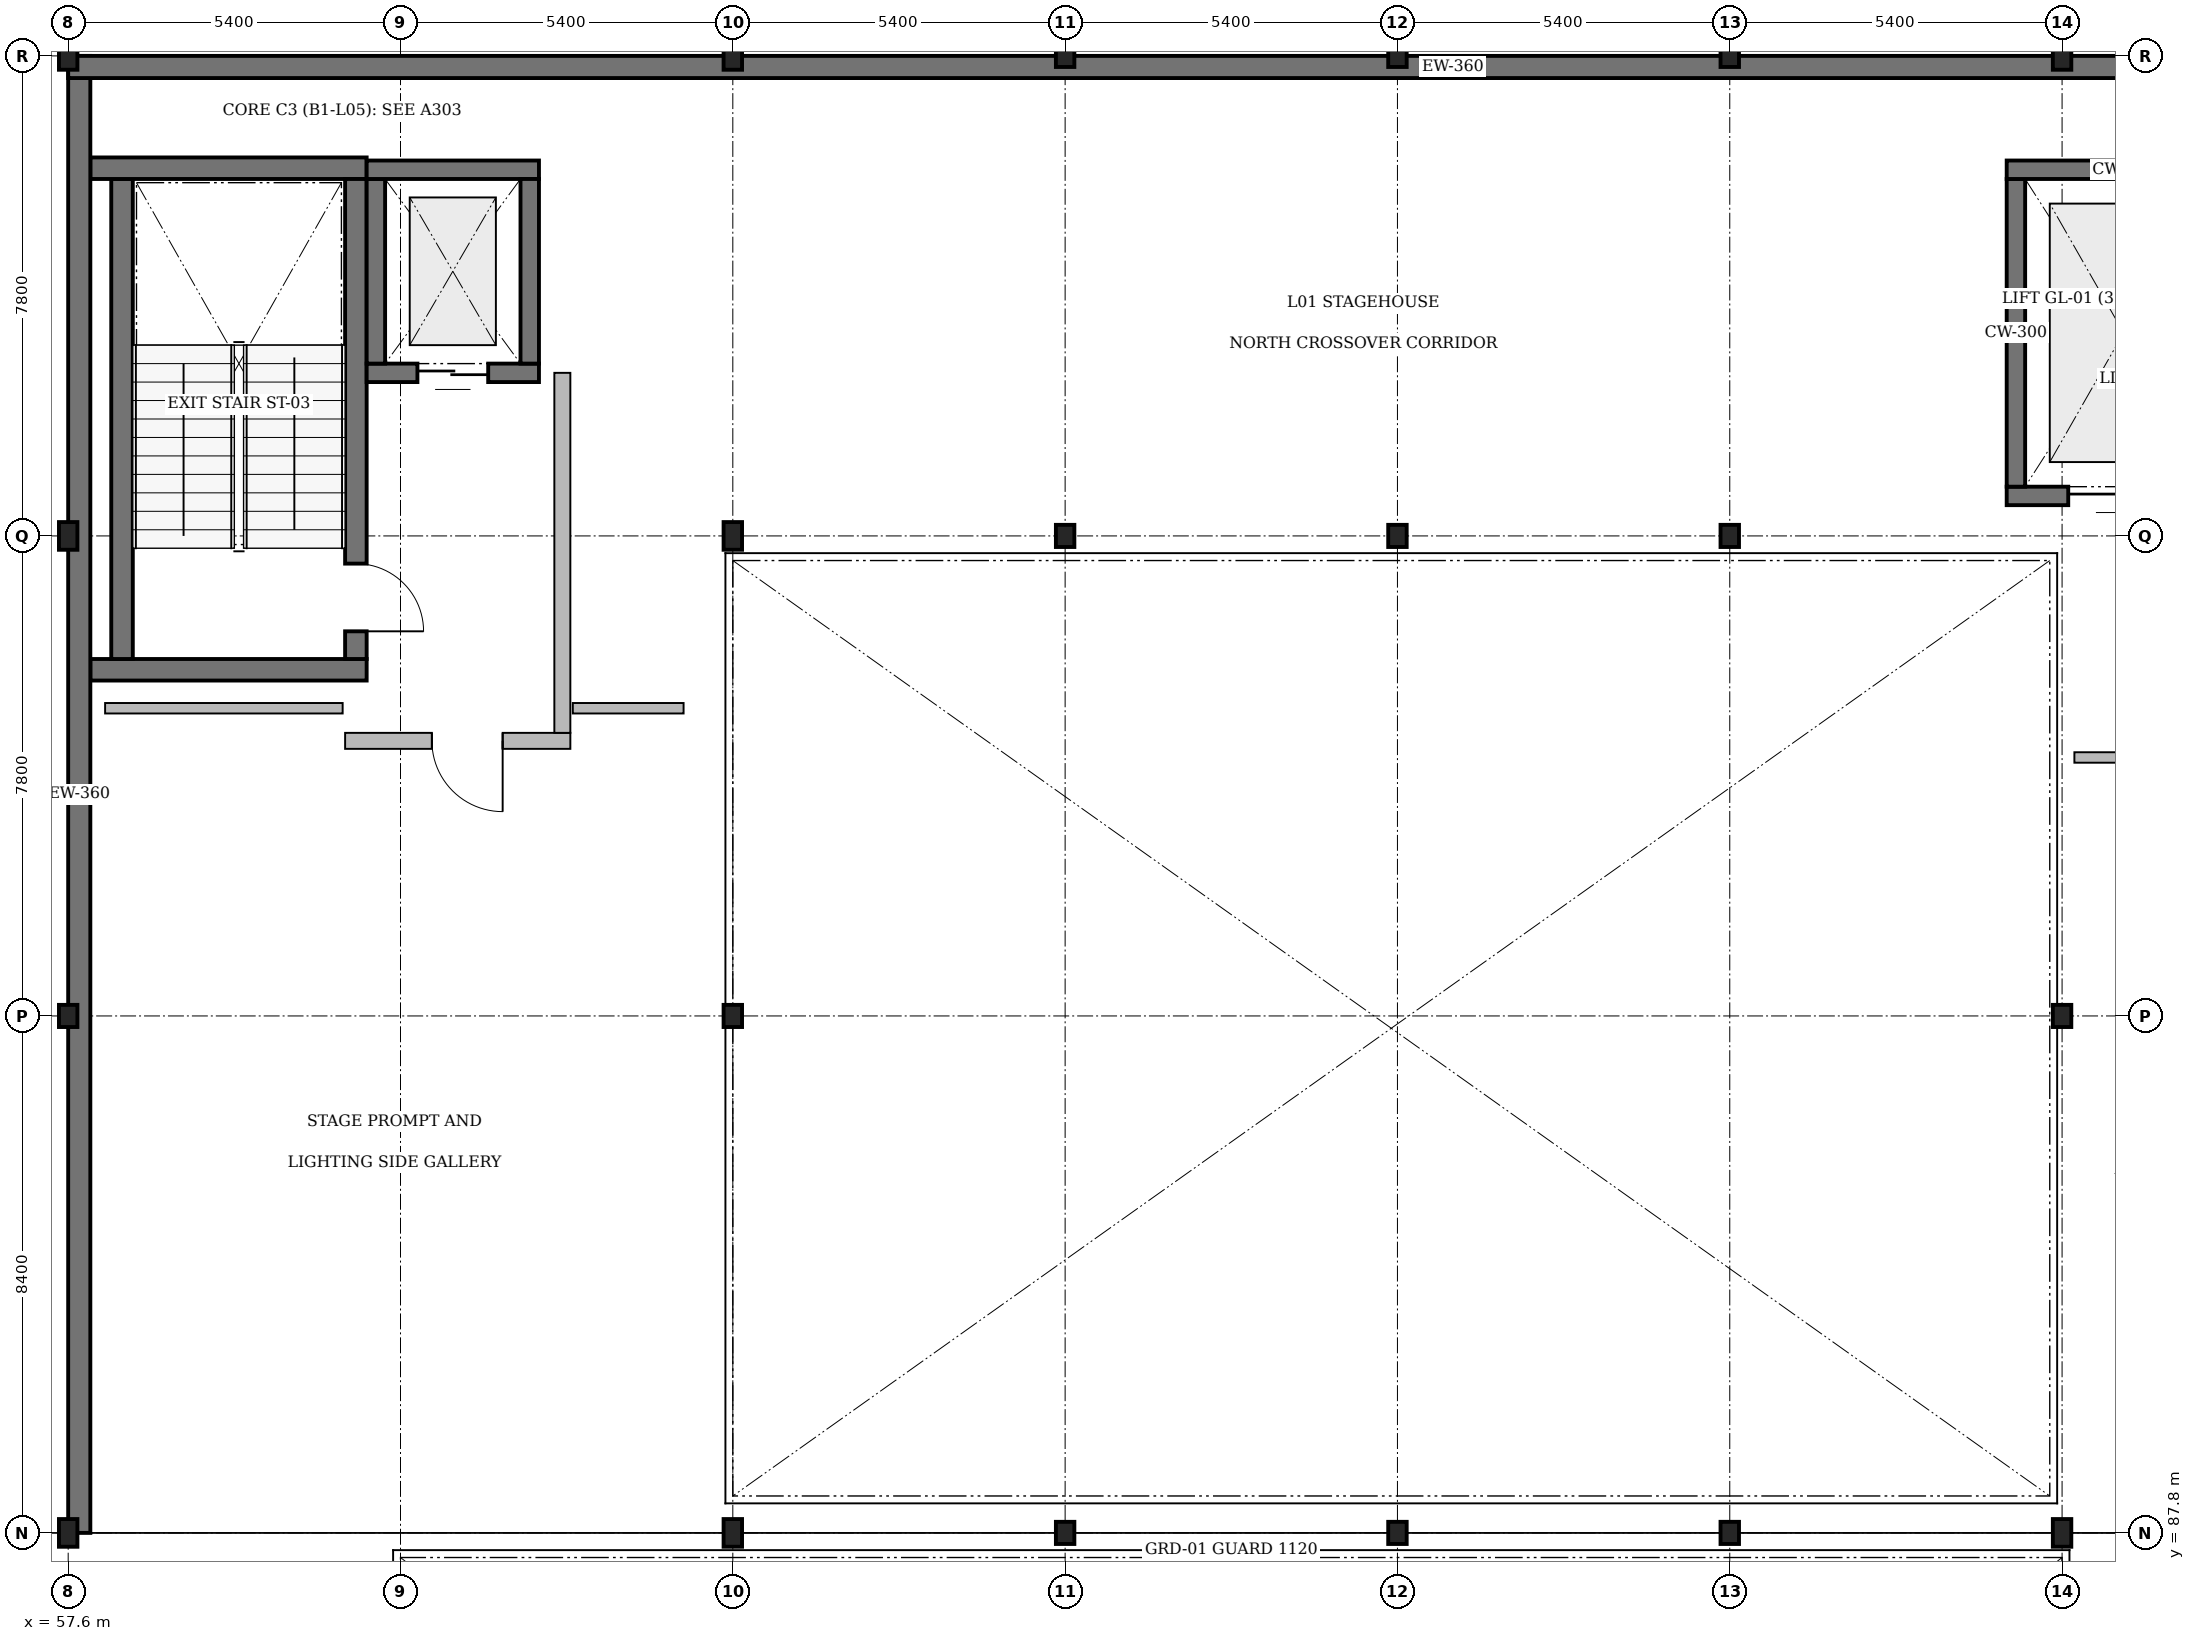
"""IFC4 building model, lengths in metres.
Left out: names, types, materials, properties, quantities, classifications, styles, units other than length and angle.
Written with IfcOpenShell. Run it as: python <this file> out.ifc"""

import sys

from ifc_helpers import new_model, si_unit, direction, frame, frame_2d, origin, origin_2d, place, context, subcontext, project, spatial, rectangle, i_section, extrude, element, fill, save


model = new_model("IFC4")
c1 = context("Model", 3, precision=1e-05, world=origin(), true_north=direction((0.0, 1.0)))
c2 = subcontext(c1, "Body", "Model", "MODEL_VIEW")
j1 = project(units=[si_unit("LENGTHUNIT", "METRE"), si_unit("PLANEANGLEUNIT", "RADIAN")], contexts=[c1])
p1 = place(None, origin())
s1 = spatial("IfcSite", under=j1, at=p1, CompositionType="ELEMENT")
p2 = place(p1, origin())
s2 = spatial("IfcBuilding", under=s1, at=p2, CompositionType="ELEMENT")
p3 = place(p2, frame((0.0, 0.0, 4.8)))
s3 = spatial("IfcBuildingStorey", under=s2, at=p3, CompositionType="ELEMENT", Elevation=4.8)
p4 = place(p3, frame((68.4, 87.8, 0.0), z_axis=(0.0, 0.0, 1.0), x_axis=(1.0, 0.0, 0.0)))
e1 = element("IfcColumn", 1, at=p4, inside=s3, PredefinedType="COLUMN", context=c2, shape_type="SweptSolid", body=[
    extrude(i_section(OverallWidth=0.3, OverallDepth=0.45, WebThickness=0.014, FlangeThickness=0.026, FilletRadius=0.027, at=origin_2d()), origin(), (0.0, 0.0, 1.0), 4.2),
])
p5 = place(p3, frame((68.4, 96.2, 0.0), z_axis=(0.0, 0.0, 1.0), x_axis=(1.0, 0.0, 0.0)))
e2 = element("IfcColumn", 2, at=p5, inside=s3, PredefinedType="COLUMN", context=c2, shape_type="SweptSolid", body=[
    extrude(i_section(OverallWidth=0.3, OverallDepth=0.36, WebThickness=0.012, FlangeThickness=0.022, FilletRadius=0.027, at=origin_2d()), origin(), (0.0, 0.0, 1.0), 4.2),
])
for number, where, z_axis, x_axis in (
    (3, (68.4, 104.0, 0.0), (0.0, 0.0, 1.0), (1.0, 0.0, 0.0)),
    (4, (68.4, 111.8, 0.0), (0.0, 0.0, 1.0), (1.0, 0.0, 0.0)),
):
    element("IfcColumn", number, at=place(p3, frame(where, z_axis=z_axis, x_axis=x_axis)), inside=s3, PredefinedType="COLUMN", context=c2, shape_type="SweptSolid", body=[
        extrude(i_section(OverallWidth=0.3, OverallDepth=0.45, WebThickness=0.014, FlangeThickness=0.026, FilletRadius=0.027, at=origin_2d()), origin(), (0.0, 0.0, 1.0), 4.2),
    ])
for number, where, z_axis, x_axis in (
    (5, (73.8, 87.8, 0.0), (0.0, 0.0, 1.0), (1.0, 0.0, 0.0)),
    (6, (73.8, 104.0, 0.0), (0.0, 0.0, 1.0), (1.0, 0.0, 0.0)),
    (7, (73.8, 111.8, 0.0), (0.0, 0.0, 1.0), (1.0, 0.0, 0.0)),
    (8, (79.2, 87.8, 0.0), (0.0, 0.0, 1.0), (1.0, 0.0, 0.0)),
    (9, (79.2, 104.0, 0.0), (0.0, 0.0, 1.0), (1.0, 0.0, 0.0)),
    (10, (79.2, 111.8, 0.0), (0.0, 0.0, 1.0), (1.0, 0.0, 0.0)),
    (11, (84.6, 87.8, 0.0), (0.0, 0.0, 1.0), (1.0, 0.0, 0.0)),
    (12, (84.6, 104.0, 0.0), (0.0, 0.0, 1.0), (1.0, 0.0, 0.0)),
    (13, (84.6, 111.8, 0.0), (0.0, 0.0, 1.0), (1.0, 0.0, 0.0)),
):
    element("IfcColumn", number, at=place(p3, frame(where, z_axis=z_axis, x_axis=x_axis)), inside=s3, PredefinedType="COLUMN", context=c2, shape_type="SweptSolid", body=[
        extrude(i_section(OverallWidth=0.3, OverallDepth=0.36, WebThickness=0.012, FlangeThickness=0.022, FilletRadius=0.027, at=origin_2d()), origin(), (0.0, 0.0, 1.0), 4.2),
    ])
p6 = place(p3, frame((90.0, 87.8, 0.0), z_axis=(0.0, 0.0, 1.0), x_axis=(1.0, 0.0, 0.0)))
e14 = element("IfcColumn", 14, at=p6, inside=s3, PredefinedType="COLUMN", context=c2, shape_type="SweptSolid", body=[
    extrude(i_section(OverallWidth=0.3, OverallDepth=0.45, WebThickness=0.014, FlangeThickness=0.026, FilletRadius=0.027, at=origin_2d()), origin(), (0.0, 0.0, 1.0), 4.2),
])
p7 = place(p3, frame((90.0, 96.2, 0.0), z_axis=(0.0, 0.0, 1.0), x_axis=(1.0, 0.0, 0.0)))
e15 = element("IfcColumn", 15, at=p7, inside=s3, PredefinedType="COLUMN", context=c2, shape_type="SweptSolid", body=[
    extrude(i_section(OverallWidth=0.3, OverallDepth=0.36, WebThickness=0.012, FlangeThickness=0.022, FilletRadius=0.027, at=origin_2d()), origin(), (0.0, 0.0, 1.0), 4.2),
])
for number, where, z_axis, x_axis in (
    (16, (90.0, 111.8, 0.0), (0.0, 0.0, 1.0), (1.0, 0.0, 0.0)),
    (17, (57.6, 87.8, 0.0), (0.0, 0.0, 1.0), (1.0, 0.0, 0.0)),
):
    element("IfcColumn", number, at=place(p3, frame(where, z_axis=z_axis, x_axis=x_axis)), inside=s3, PredefinedType="COLUMN", context=c2, shape_type="SweptSolid", body=[
        extrude(i_section(OverallWidth=0.3, OverallDepth=0.45, WebThickness=0.014, FlangeThickness=0.026, FilletRadius=0.027, at=origin_2d()), origin(), (0.0, 0.0, 1.0), 4.2),
    ])
p8 = place(p3, frame((57.6, 96.2, 0.0), z_axis=(0.0, 0.0, 1.0), x_axis=(1.0, 0.0, 0.0)))
e18 = element("IfcColumn", 18, at=p8, inside=s3, PredefinedType="COLUMN", context=c2, shape_type="SweptSolid", body=[
    extrude(i_section(OverallWidth=0.3, OverallDepth=0.36, WebThickness=0.012, FlangeThickness=0.022, FilletRadius=0.027, at=origin_2d()), origin(), (0.0, 0.0, 1.0), 4.2),
])
for number, where, z_axis, x_axis in (
    (19, (57.6, 104.0, 0.0), (0.0, 0.0, 1.0), (1.0, 0.0, 0.0)),
    (20, (57.6, 111.8, 0.0), (0.0, 0.0, 1.0), (1.0, 0.0, 0.0)),
):
    element("IfcColumn", number, at=place(p3, frame(where, z_axis=z_axis, x_axis=x_axis)), inside=s3, PredefinedType="COLUMN", context=c2, shape_type="SweptSolid", body=[
        extrude(i_section(OverallWidth=0.3, OverallDepth=0.45, WebThickness=0.014, FlangeThickness=0.026, FilletRadius=0.027, at=origin_2d()), origin(), (0.0, 0.0, 1.0), 4.2),
    ])
p9 = place(p3, frame((62.45, 101.825, 0.0), z_axis=(0.0, 0.0, 1.0), x_axis=(-1.0, 0.0, 0.0)))
e21 = element("IfcWall", 21, at=p9, inside=s3, PredefinedType="SOLIDWALL", context=c2, shape_type="SweptSolid", body=[
    extrude(rectangle(XDim=4.49, YDim=0.35, at=frame_2d((2.245, 0.0))), origin(), (0.0, 0.0, 1.0), 4.2),
])
p10 = place(p3, frame((58.475, 102.0, 0.0), z_axis=(0.0, 0.0, 1.0), x_axis=(0.0, 1.0, 0.0)))
e22 = element("IfcWall", 22, at=p10, inside=s3, PredefinedType="SOLIDWALL", context=c2, shape_type="SweptSolid", body=[
    extrude(rectangle(XDim=7.8, YDim=0.35, at=frame_2d((3.9, 0.0))), origin(), (0.0, 0.0, 1.0), 4.2),
])
p11 = place(p3, frame((57.96, 109.975, 0.0), z_axis=(0.0, 0.0, 1.0), x_axis=(1.0, 0.0, 0.0)))
e23 = element("IfcWall", 23, at=p11, inside=s3, PredefinedType="SOLIDWALL", context=c2, shape_type="SweptSolid", body=[
    extrude(rectangle(XDim=4.49, YDim=0.35, at=frame_2d((2.245, 0.0))), origin(), (0.0, 0.0, 1.0), 4.2),
])
p12 = place(p3, frame((62.275, 109.8, 0.0), z_axis=(0.0, 0.0, 1.0), x_axis=(0.0, -1.0, 0.0)))
e24 = element("IfcWall", 24, at=p12, inside=s3, PredefinedType="SOLIDWALL", context=c2, shape_type="SweptSolid", body=[
    extrude(rectangle(XDim=7.8, YDim=0.35, at=frame_2d((3.9, 0.0))), origin(), (0.0, 0.0, 1.0), 4.2),
])
p13 = place(p12, frame((6.25, 0.0, 0.0)))
e25 = element("IfcOpeningElement", 25, at=p13, cuts=e24, PredefinedType="OPENING", context=c2, shape_type="SweptSolid", body=[
    extrude(rectangle(XDim=1.1, YDim=2.15, at=frame_2d((0.55, 1.075))), frame((0.0, 0.195, 0.0), z_axis=(0.0, -1.0, 0.0), x_axis=(1.0, 0.0, 0.0)), (0.0, 0.0, 1.0), 0.39),
])
p14 = place(p3, frame((65.25, 106.65, 0.0), z_axis=(0.0, 0.0, 1.0), x_axis=(-1.0, 0.0, 0.0)))
e26 = element("IfcWall", 26, at=p14, inside=s3, PredefinedType="SOLIDWALL", context=c2, shape_type="SweptSolid", body=[
    extrude(rectangle(XDim=2.8, YDim=0.3, at=frame_2d((1.4, 0.0))), origin(), (0.0, 0.0, 1.0), 4.2),
])
p15 = place(p14, frame((0.825, 0.0, 0.0)))
e27 = element("IfcOpeningElement", 27, at=p15, cuts=e26, PredefinedType="OPENING", context=c2, shape_type="SweptSolid", body=[
    extrude(rectangle(XDim=1.15, YDim=2.1, at=frame_2d((0.575, 1.05))), frame((0.0, 0.17, 0.0), z_axis=(0.0, -1.0, 0.0), x_axis=(1.0, 0.0, 0.0)), (0.0, 0.0, 1.0), 0.34),
])
p16 = place(p3, frame((62.6, 106.8, 0.0), z_axis=(0.0, 0.0, 1.0), x_axis=(0.0, 1.0, 0.0)))
e28 = element("IfcWall", 28, at=p16, inside=s3, PredefinedType="SOLIDWALL", context=c2, shape_type="SweptSolid", body=[
    extrude(rectangle(XDim=3.0, YDim=0.3, at=frame_2d((1.5, 0.0))), origin(), (0.0, 0.0, 1.0), 4.2),
])
p17 = place(p3, frame((62.45, 109.95, 0.0), z_axis=(0.0, 0.0, 1.0), x_axis=(1.0, 0.0, 0.0)))
e29 = element("IfcWall", 29, at=p17, inside=s3, PredefinedType="SOLIDWALL", context=c2, shape_type="SweptSolid", body=[
    extrude(rectangle(XDim=2.8, YDim=0.3, at=frame_2d((1.4, 0.0))), origin(), (0.0, 0.0, 1.0), 4.2),
])
p18 = place(p3, frame((65.1, 109.8, 0.0), z_axis=(0.0, 0.0, 1.0), x_axis=(0.0, -1.0, 0.0)))
e30 = element("IfcWall", 30, at=p18, inside=s3, PredefinedType="SOLIDWALL", context=c2, shape_type="SweptSolid", body=[
    extrude(rectangle(XDim=3.0, YDim=0.3, at=frame_2d((1.5, 0.0))), origin(), (0.0, 0.0, 1.0), 4.2),
])
p19 = place(p3, frame((65.76, 100.67, 0.0), z_axis=(0.0, 0.0, 1.0), x_axis=(-1.0, 0.0, 0.0)))
e31 = element("IfcWall", 31, at=p19, inside=s3, PredefinedType="SOLIDWALL", context=c2, shape_type="SweptSolid", body=[
    extrude(rectangle(XDim=3.66, YDim=0.26, at=frame_2d((1.83, 0.0))), origin(), (0.0, 0.0, 1.0), 3.94),
])
p20 = place(p19, frame((1.1, 0.0, 0.0)))
e32 = element("IfcOpeningElement", 32, at=p20, cuts=e31, PredefinedType="OPENING", context=c2, shape_type="SweptSolid", body=[
    extrude(rectangle(XDim=1.15, YDim=2.2, at=frame_2d((0.575, 1.1))), frame((0.0, 0.15, 0.0), z_axis=(0.0, -1.0, 0.0), x_axis=(1.0, 0.0, 0.0)), (0.0, 0.0, 1.0), 0.3),
])
p21 = place(p3, frame((65.63, 106.65, 0.0), z_axis=(0.0, 0.0, 1.0), x_axis=(0.0, -1.0, 0.0)))
e33 = element("IfcWall", 33, at=p21, inside=s3, PredefinedType="SOLIDWALL", context=c2, shape_type="SweptSolid", body=[
    extrude(rectangle(XDim=5.85, YDim=0.26, at=frame_2d((2.925, 0.0))), origin(), (0.0, 0.0, 1.0), 3.94),
])
p22 = place(p3, frame((92.9, 104.65, 0.0), z_axis=(0.0, 0.0, 1.0), x_axis=(-1.0, 0.0, 0.0)))
e34 = element("IfcWall", 34, at=p22, inside=s3, PredefinedType="SOLIDWALL", context=c2, shape_type="SweptSolid", body=[
    extrude(rectangle(XDim=3.8, YDim=0.3, at=frame_2d((1.9, 0.0))), origin(), (0.0, 0.0, 1.0), 4.2),
])
p23 = place(p22, frame((1.0, 0.0, 0.0)))
e35 = element("IfcOpeningElement", 35, at=p23, cuts=e34, PredefinedType="OPENING", context=c2, shape_type="SweptSolid", body=[
    extrude(rectangle(XDim=1.8, YDim=2.4, at=frame_2d((0.9, 1.2))), frame((0.0, 0.17, 0.0), z_axis=(0.0, -1.0, 0.0), x_axis=(1.0, 0.0, 0.0)), (0.0, 0.0, 1.0), 0.34),
])
p24 = place(p3, frame((89.25, 104.8, 0.0), z_axis=(0.0, 0.0, 1.0), x_axis=(0.0, 1.0, 0.0)))
e36 = element("IfcWall", 36, at=p24, inside=s3, PredefinedType="SOLIDWALL", context=c2, shape_type="SweptSolid", body=[
    extrude(rectangle(XDim=5.0, YDim=0.3, at=frame_2d((2.5, 0.0))), origin(), (0.0, 0.0, 1.0), 4.2),
])
p25 = place(p3, frame((89.1, 109.95, 0.0), z_axis=(0.0, 0.0, 1.0), x_axis=(1.0, 0.0, 0.0)))
e37 = element("IfcWall", 37, at=p25, inside=s3, PredefinedType="SOLIDWALL", context=c2, shape_type="SweptSolid", body=[
    extrude(rectangle(XDim=3.8, YDim=0.3, at=frame_2d((1.9, 0.0))), origin(), (0.0, 0.0, 1.0), 4.2),
])
p26 = place(p3, frame((57.78, 87.8, 0.0), z_axis=(0.0, 0.0, 1.0), x_axis=(0.0, 1.0, 0.0)))
e38 = element("IfcWall", 38, at=p26, inside=s3, PredefinedType="SOLIDWALL", context=c2, shape_type="SweptSolid", body=[
    extrude(rectangle(XDim=24.0, YDim=0.36, at=frame_2d((12.0, 0.0))), origin(), (0.0, 0.0, 1.0), 3.94),
])
p27 = place(p3, frame((57.6, 111.62, 0.0), z_axis=(0.0, 0.0, 1.0), x_axis=(1.0, 0.0, 0.0)))
e39 = element("IfcWall", 39, at=p27, inside=s3, PredefinedType="SOLIDWALL", context=c2, shape_type="SweptSolid", body=[
    extrude(rectangle(XDim=45.0, YDim=0.36, at=frame_2d((22.5, 0.0))), origin(), (0.0, 0.0, 1.0), 3.94),
])
p28 = place(p3, frame((58.2, 101.2, 0.0), z_axis=(0.0, 0.0, 1.0), x_axis=(1.0, 0.0, 0.0)))
e40 = element("IfcWall", 40, at=p28, inside=s3, PredefinedType="PARTITIONING", context=c2, shape_type="SweptSolid", body=[
    extrude(rectangle(XDim=3.86, YDim=0.17, at=frame_2d((1.93, 0.0))), origin(), (0.0, 0.0, 1.0), 3.94),
])
p29 = place(p3, frame((65.8, 101.2, 0.0), z_axis=(0.0, 0.0, 1.0), x_axis=(1.0, 0.0, 0.0)))
e41 = element("IfcWall", 41, at=p29, inside=s3, PredefinedType="PARTITIONING", context=c2, shape_type="SweptSolid", body=[
    extrude(rectangle(XDim=1.8, YDim=0.17, at=frame_2d((0.9, 0.0))), origin(), (0.0, 0.0, 1.0), 3.94),
])
p30 = place(p3, frame((90.2, 100.4, 0.0), z_axis=(0.0, 0.0, 1.0), x_axis=(1.0, 0.0, 0.0)))
e42 = element("IfcWall", 42, at=p30, inside=s3, PredefinedType="PARTITIONING", context=c2, shape_type="SweptSolid", body=[
    extrude(rectangle(XDim=5.2, YDim=0.17, at=frame_2d((2.6, 0.0))), origin(), (0.0, 0.0, 1.0), 3.94),
])
p31 = place(p30, frame((3.75, 0.0, 0.0)))
e43 = element("IfcOpeningElement", 43, at=p31, cuts=e42, PredefinedType="OPENING", context=c2, shape_type="SweptSolid", body=[
    extrude(rectangle(XDim=1.1, YDim=2.1, at=frame_2d((0.55, 1.05))), frame((0.0, 0.105, 0.0), z_axis=(0.0, -1.0, 0.0), x_axis=(1.0, 0.0, 0.0)), (0.0, 0.0, 1.0), 0.21),
])
p32 = place(p13, origin())
e44 = element("IfcDoor", 44, at=p32, inside=s3, OperationType="SINGLE_SWING_RIGHT", PredefinedType="DOOR", context=c2, shape_type="SweptSolid", body=[
    extrude(rectangle(XDim=1.1, YDim=2.15, at=frame_2d((0.55, 1.075))), frame((0.0, 0.025, 0.0), z_axis=(0.0, -1.0, 0.0), x_axis=(1.0, 0.0, 0.0)), (0.0, 0.0, 1.0), 0.05),
])
fill(e25, e44)
p33 = place(p15, origin())
e45 = element("IfcDoor", 45, at=p33, inside=s3, OperationType="DOUBLE_DOOR_SLIDING", PredefinedType="DOOR", context=c2, shape_type="SweptSolid", body=[
    extrude(rectangle(XDim=1.15, YDim=2.1, at=frame_2d((0.575, 1.05))), frame((0.0, 0.025, 0.0), z_axis=(0.0, -1.0, 0.0), x_axis=(1.0, 0.0, 0.0)), (0.0, 0.0, 1.0), 0.05),
])
fill(e27, e45)
p34 = place(p20, origin())
e46 = element("IfcDoor", 46, at=p34, inside=s3, OperationType="SINGLE_SWING_LEFT", PredefinedType="DOOR", context=c2, shape_type="SweptSolid", body=[
    extrude(rectangle(XDim=1.15, YDim=2.2, at=frame_2d((0.575, 1.1))), frame((0.0, 0.025, 0.0), z_axis=(0.0, -1.0, 0.0), x_axis=(1.0, 0.0, 0.0)), (0.0, 0.0, 1.0), 0.05),
])
fill(e32, e46)
p35 = place(p23, origin())
e47 = element("IfcDoor", 47, at=p35, inside=s3, OperationType="DOUBLE_DOOR_SLIDING", PredefinedType="DOOR", context=c2, shape_type="SweptSolid", body=[
    extrude(rectangle(XDim=1.8, YDim=2.4, at=frame_2d((0.9, 1.2))), frame((0.0, 0.025, 0.0), z_axis=(0.0, -1.0, 0.0), x_axis=(1.0, 0.0, 0.0)), (0.0, 0.0, 1.0), 0.05),
])
fill(e35, e47)
save(model, sys.argv[1])
